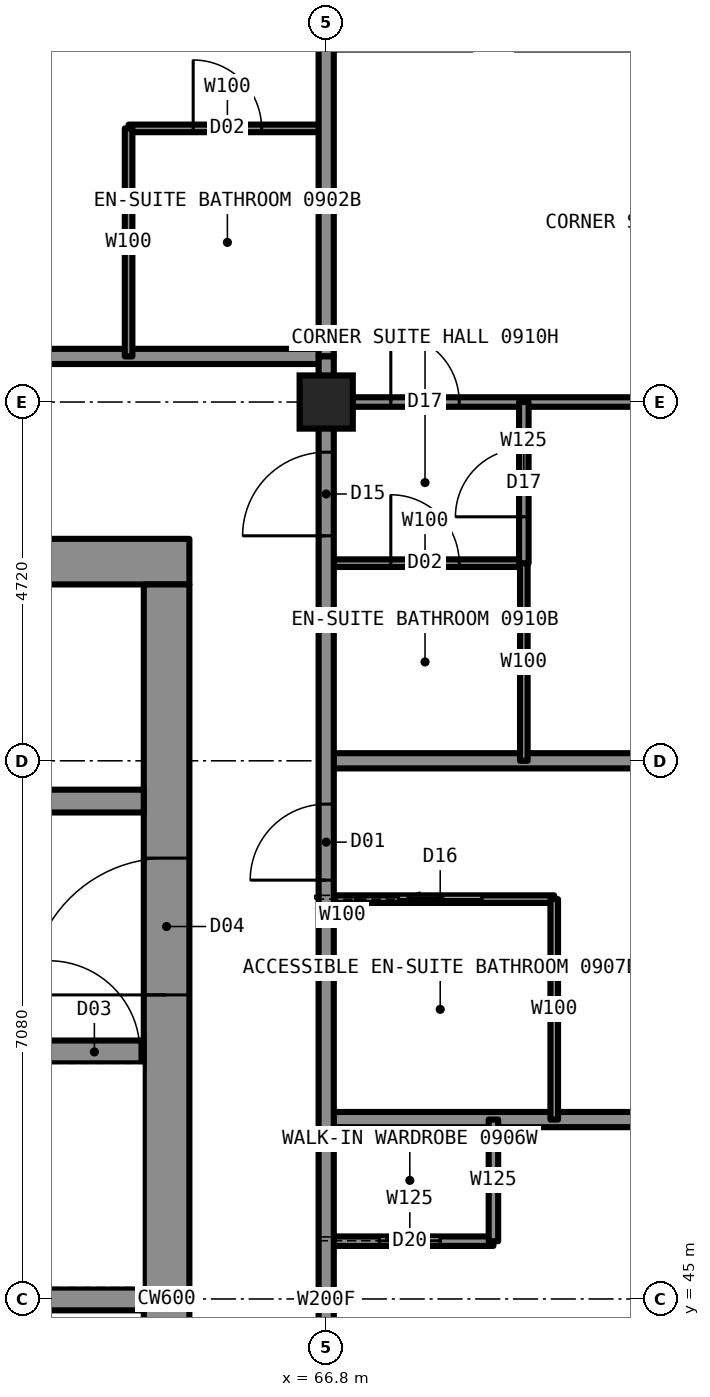
"""IFC4 building model, lengths in metres.
Left out: names, types, materials, properties, quantities, classifications, styles, units other than length and angle.
Written with IfcOpenShell. Run it as: python <this file> out.ifc"""

import sys

from ifc_helpers import new_model, si_unit, direction, frame, frame_2d, origin, origin_2d, place, context, subcontext, project, spatial, rectangle, hollow_rectangle, extrude, element, fill, save


model = new_model("IFC4")
c1 = context("Model", 3, precision=1e-05, world=origin(), true_north=direction((0.0, 1.0)))
c2 = subcontext(c1, "Body", "Model", "MODEL_VIEW")
j1 = project(units=[si_unit("LENGTHUNIT", "METRE"), si_unit("PLANEANGLEUNIT", "RADIAN")], contexts=[c1])
p1 = place(None, origin())
s1 = spatial("IfcSite", under=j1, at=p1, CompositionType="ELEMENT")
p2 = place(p1, origin())
s2 = spatial("IfcBuilding", under=s1, at=p2, CompositionType="ELEMENT")
p3 = place(p2, frame((0.0, 0.0, 39.0)))
s3 = spatial("IfcBuildingStorey", under=s2, at=p3, CompositionType="ELEMENT", Elevation=39.0)
p4 = place(p3, frame((66.8, 56.8, 0.0), z_axis=(0.0, 0.0, 1.0), x_axis=(1.0, 0.0, 0.0)))
e1 = element("IfcColumn", 1, at=p4, inside=s3, PredefinedType="COLUMN", context=c2, shape_type="SweptSolid", body=[
    extrude(hollow_rectangle(XDim=0.7, YDim=0.7, WallThickness=0.06, at=origin_2d()), origin(), (0.0, 0.0, 1.0), 3.5),
])
p5 = place(p3, frame((45.0, 54.7, 0.0), z_axis=(0.0, 0.0, 1.0), x_axis=(1.0, 0.0, 0.0)))
e2 = element("IfcWall", 2, at=p5, inside=s3, PredefinedType="SHEAR", context=c2, shape_type="SweptSolid", body=[
    extrude(rectangle(XDim=20.0, YDim=0.6, at=frame_2d((10.0, 0.0))), origin(), (0.0, 0.0, 1.0), 3.5),
])
p6 = place(p3, frame((64.7, 35.6, 0.0), z_axis=(0.0, 0.0, 1.0), x_axis=(0.0, 1.0, 0.0)))
e3 = element("IfcWall", 3, at=p6, inside=s3, PredefinedType="SHEAR", context=c2, shape_type="SweptSolid", body=[
    extrude(rectangle(XDim=18.8, YDim=0.6, at=frame_2d((9.4, 0.0))), origin(), (0.0, 0.0, 1.0), 3.5),
])
p7 = place(p6, frame((13.4, 0.0, 0.0)))
e4 = element("IfcOpeningElement", 4, at=p7, cuts=e3, PredefinedType="OPENING", context=c2, shape_type="SweptSolid", body=[
    extrude(rectangle(XDim=1.8, YDim=2.2, at=frame_2d((0.9, 1.1))), frame((0.0, 0.31, 0.0), z_axis=(0.0, -1.0, 0.0), x_axis=(1.0, 0.0, 0.0)), (0.0, 0.0, 1.0), 0.62),
])
p8 = place(p6, frame((3.6, 0.0, 0.0)))
e5 = element("IfcOpeningElement", 5, at=p8, cuts=e3, PredefinedType="OPENING", context=c2, shape_type="SweptSolid", body=[
    extrude(rectangle(XDim=1.8, YDim=2.2, at=frame_2d((0.9, 1.1))), frame((0.0, 0.31, 0.0), z_axis=(0.0, -1.0, 0.0), x_axis=(1.0, 0.0, 0.0)), (0.0, 0.0, 1.0), 0.62),
])
p9 = place(p3, frame((45.6, 51.55, 0.0), z_axis=(0.0, 0.0, 1.0), x_axis=(1.0, 0.0, 0.0)))
e6 = element("IfcWall", 6, at=p9, inside=s3, PredefinedType="SHEAR", context=c2, shape_type="SweptSolid", body=[
    extrude(rectangle(XDim=18.8, YDim=0.3, at=frame_2d((9.4, 0.0))), origin(), (0.0, 0.0, 1.0), 3.5),
])
p10 = place(p9, frame((0.7, 0.0, 0.0)))
e7 = element("IfcOpeningElement", 7, at=p10, cuts=e6, PredefinedType="OPENING", context=c2, shape_type="SweptSolid", body=[
    extrude(rectangle(XDim=1.1, YDim=2.2, at=frame_2d((0.55, 1.1))), frame((0.0, 0.16, 0.0), z_axis=(0.0, -1.0, 0.0), x_axis=(1.0, 0.0, 0.0)), (0.0, 0.0, 1.0), 0.32),
])
p11 = place(p9, frame((3.4, 0.0, 0.0)))
e8 = element("IfcOpeningElement", 8, at=p11, cuts=e6, PredefinedType="OPENING", context=c2, shape_type="SweptSolid", body=[
    extrude(rectangle(XDim=1.1, YDim=2.2, at=frame_2d((0.55, 1.1))), frame((0.0, 0.16, 0.0), z_axis=(0.0, -1.0, 0.0), x_axis=(1.0, 0.0, 0.0)), (0.0, 0.0, 1.0), 0.32),
])
p12 = place(p9, frame((6.1, 0.0, 0.0)))
e9 = element("IfcOpeningElement", 9, at=p12, cuts=e6, PredefinedType="OPENING", context=c2, shape_type="SweptSolid", body=[
    extrude(rectangle(XDim=1.1, YDim=2.2, at=frame_2d((0.55, 1.1))), frame((0.0, 0.16, 0.0), z_axis=(0.0, -1.0, 0.0), x_axis=(1.0, 0.0, 0.0)), (0.0, 0.0, 1.0), 0.32),
])
p13 = place(p9, frame((8.8, 0.0, 0.0)))
e10 = element("IfcOpeningElement", 10, at=p13, cuts=e6, PredefinedType="OPENING", context=c2, shape_type="SweptSolid", body=[
    extrude(rectangle(XDim=1.1, YDim=2.2, at=frame_2d((0.55, 1.1))), frame((0.0, 0.16, 0.0), z_axis=(0.0, -1.0, 0.0), x_axis=(1.0, 0.0, 0.0)), (0.0, 0.0, 1.0), 0.32),
])
p14 = place(p9, frame((11.6, 0.0, 0.0)))
e11 = element("IfcOpeningElement", 11, at=p14, cuts=e6, PredefinedType="OPENING", context=c2, shape_type="SweptSolid", body=[
    extrude(rectangle(XDim=1.1, YDim=2.2, at=frame_2d((0.55, 1.1))), frame((0.0, 0.16, 0.0), z_axis=(0.0, -1.0, 0.0), x_axis=(1.0, 0.0, 0.0)), (0.0, 0.0, 1.0), 0.32),
])
p15 = place(p9, frame((14.3, 0.0, 0.0)))
e12 = element("IfcOpeningElement", 12, at=p15, cuts=e6, PredefinedType="OPENING", context=c2, shape_type="SweptSolid", body=[
    extrude(rectangle(XDim=1.1, YDim=2.2, at=frame_2d((0.55, 1.1))), frame((0.0, 0.16, 0.0), z_axis=(0.0, -1.0, 0.0), x_axis=(1.0, 0.0, 0.0)), (0.0, 0.0, 1.0), 0.32),
])
p16 = place(p3, frame((56.2, 48.25, 0.0), z_axis=(0.0, 0.0, 1.0), x_axis=(1.0, 0.0, 0.0)))
e13 = element("IfcWall", 13, at=p16, inside=s3, PredefinedType="SHEAR", context=c2, shape_type="SweptSolid", body=[
    extrude(rectangle(XDim=8.2, YDim=0.3, at=frame_2d((4.1, 0.0))), origin(), (0.0, 0.0, 1.0), 3.5),
])
p17 = place(p16, frame((6.95, 0.0, 0.0)))
e14 = element("IfcOpeningElement", 14, at=p17, cuts=e13, PredefinedType="OPENING", context=c2, shape_type="SweptSolid", body=[
    extrude(rectangle(XDim=1.2, YDim=2.2, at=frame_2d((0.6, 1.1))), frame((0.0, 0.16, 0.0), z_axis=(0.0, -1.0, 0.0), x_axis=(1.0, 0.0, 0.0)), (0.0, 0.0, 1.0), 0.32),
])
p18 = place(p3, frame((56.5, 45.0, 0.0), z_axis=(0.0, 0.0, 1.0), x_axis=(1.0, 0.0, 0.0)))
e15 = element("IfcWall", 15, at=p18, inside=s3, PredefinedType="SHEAR", context=c2, shape_type="SweptSolid", body=[
    extrude(rectangle(XDim=7.9, YDim=0.3, at=frame_2d((3.95, 0.0))), origin(), (0.0, 0.0, 1.0), 3.5),
])
p19 = place(p3, frame((66.8, 45.76, 0.0), z_axis=(0.0, 0.0, 1.0), x_axis=(1.0, 0.0, 0.0)))
e16 = element("IfcWall", 16, at=p19, inside=s3, PredefinedType="PARTITIONING", context=c2, shape_type="SweptSolid", body=[
    extrude(rectangle(XDim=2.2, YDim=0.125, at=frame_2d((1.1, 0.0))), origin(), (0.0, 0.0, 1.0), 3.33),
])
p20 = place(p19, frame((0.7, 0.0, 0.0)))
e17 = element("IfcOpeningElement", 17, at=p20, cuts=e16, PredefinedType="OPENING", context=c2, shape_type="SweptSolid", body=[
    extrude(rectangle(XDim=0.8, YDim=2.1, at=frame_2d((0.4, 1.05))), frame((0.0, 0.073, 0.0), z_axis=(0.0, -1.0, 0.0), x_axis=(1.0, 0.0, 0.0)), (0.0, 0.0, 1.0), 0.145),
])
p21 = place(p3, frame((66.8, 56.8, 0.0), z_axis=(0.0, 0.0, 1.0), x_axis=(1.0, 0.0, 0.0)))
e18 = element("IfcWall", 18, at=p21, inside=s3, PredefinedType="PARTITIONING", context=c2, shape_type="SweptSolid", body=[
    extrude(rectangle(XDim=9.9, YDim=0.125, at=frame_2d((4.95, 0.0))), origin(), (0.0, 0.0, 1.0), 2.573),
])
p22 = place(p21, frame((0.85, 0.0, 0.0)))
e19 = element("IfcOpeningElement", 19, at=p22, cuts=e18, PredefinedType="OPENING", context=c2, shape_type="SweptSolid", body=[
    extrude(rectangle(XDim=0.9, YDim=2.2, at=frame_2d((0.45, 1.1))), frame((0.0, 0.073, 0.0), z_axis=(0.0, -1.0, 0.0), x_axis=(1.0, 0.0, 0.0)), (0.0, 0.0, 1.0), 0.145),
])
p23 = place(p3, frame((43.2, 57.4, 0.0), z_axis=(0.0, 0.0, 1.0), x_axis=(1.0, 0.0, 0.0)))
e20 = element("IfcWall", 20, at=p23, inside=s3, PredefinedType="PARTITIONING", context=c2, shape_type="SweptSolid", body=[
    extrude(rectangle(XDim=23.6, YDim=0.2, at=frame_2d((11.8, 0.0))), origin(), (0.0, 0.0, 1.0), 3.33),
])
p24 = place(p23, frame((3.0, 0.0, 0.0)))
e21 = element("IfcOpeningElement", 21, at=p24, cuts=e20, PredefinedType="OPENING", context=c2, shape_type="SweptSolid", body=[
    extrude(rectangle(XDim=1.0, YDim=2.2, at=frame_2d((0.5, 1.1))), frame((0.0, 0.11, 0.0), z_axis=(0.0, -1.0, 0.0), x_axis=(1.0, 0.0, 0.0)), (0.0, 0.0, 1.0), 0.22),
])
p25 = place(p23, frame((11.29, 0.0, 0.0)))
e22 = element("IfcOpeningElement", 22, at=p25, cuts=e20, PredefinedType="OPENING", context=c2, shape_type="SweptSolid", body=[
    extrude(rectangle(XDim=1.1, YDim=2.2, at=frame_2d((0.55, 1.1))), frame((0.0, 0.11, 0.0), z_axis=(0.0, -1.0, 0.0), x_axis=(1.0, 0.0, 0.0)), (0.0, 0.0, 1.0), 0.22),
])
p26 = place(p3, frame((64.2, 60.4, 0.0), z_axis=(0.0, 0.0, 1.0), x_axis=(1.0, 0.0, 0.0)))
e23 = element("IfcWall", 23, at=p26, inside=s3, PredefinedType="PARTITIONING", context=c2, shape_type="SweptSolid", body=[
    extrude(rectangle(XDim=2.6, YDim=0.1, at=frame_2d((1.3, 0.0))), origin(), (0.0, 0.0, 1.0), 3.33),
])
p27 = place(p26, frame((0.85, 0.0, 0.0)))
e24 = element("IfcOpeningElement", 24, at=p27, cuts=e23, PredefinedType="OPENING", context=c2, shape_type="SweptSolid", body=[
    extrude(rectangle(XDim=0.9, YDim=2.1, at=frame_2d((0.45, 1.05))), frame((0.0, 0.06, 0.0), z_axis=(0.0, -1.0, 0.0), x_axis=(1.0, 0.0, 0.0)), (0.0, 0.0, 1.0), 0.12),
])
p28 = place(p3, frame((66.8, 47.36, 0.0), z_axis=(0.0, 0.0, 1.0), x_axis=(1.0, 0.0, 0.0)))
e25 = element("IfcWall", 25, at=p28, inside=s3, PredefinedType="PARTITIONING", context=c2, shape_type="SweptSolid", body=[
    extrude(rectangle(XDim=9.9, YDim=0.2, at=frame_2d((4.95, 0.0))), origin(), (0.0, 0.0, 1.0), 2.723),
])
p29 = place(p3, frame((66.8, 50.26, 0.0), z_axis=(0.0, 0.0, 1.0), x_axis=(1.0, 0.0, 0.0)))
e26 = element("IfcWall", 26, at=p29, inside=s3, PredefinedType="PARTITIONING", context=c2, shape_type="SweptSolid", body=[
    extrude(rectangle(XDim=3.0, YDim=0.1, at=frame_2d((1.5, 0.0))), origin(), (0.0, 0.0, 1.0), 3.33),
])
p30 = place(p29, frame((0.95, 0.0, 0.0)))
e27 = element("IfcOpeningElement", 27, at=p30, cuts=e26, PredefinedType="OPENING", context=c2, shape_type="SweptSolid", body=[
    extrude(rectangle(XDim=1.1, YDim=2.1, at=frame_2d((0.55, 1.05))), frame((0.0, 0.06, 0.0), z_axis=(0.0, -1.0, 0.0), x_axis=(1.0, 0.0, 0.0)), (0.0, 0.0, 1.0), 0.12),
])
p31 = place(p3, frame((66.8, 52.08, 0.0), z_axis=(0.0, 0.0, 1.0), x_axis=(1.0, 0.0, 0.0)))
e28 = element("IfcWall", 28, at=p31, inside=s3, PredefinedType="PARTITIONING", context=c2, shape_type="SweptSolid", body=[
    extrude(rectangle(XDim=9.9, YDim=0.2, at=frame_2d((4.95, 0.0))), origin(), (0.0, 0.0, 1.0), 2.573),
])
p32 = place(p3, frame((66.8, 54.68, 0.0), z_axis=(0.0, 0.0, 1.0), x_axis=(1.0, 0.0, 0.0)))
e29 = element("IfcWall", 29, at=p32, inside=s3, PredefinedType="PARTITIONING", context=c2, shape_type="SweptSolid", body=[
    extrude(rectangle(XDim=2.6, YDim=0.1, at=frame_2d((1.3, 0.0))), origin(), (0.0, 0.0, 1.0), 3.33),
])
p33 = place(p32, frame((0.85, 0.0, 0.0)))
e30 = element("IfcOpeningElement", 30, at=p33, cuts=e29, PredefinedType="OPENING", context=c2, shape_type="SweptSolid", body=[
    extrude(rectangle(XDim=0.9, YDim=2.1, at=frame_2d((0.45, 1.05))), frame((0.0, 0.06, 0.0), z_axis=(0.0, -1.0, 0.0), x_axis=(1.0, 0.0, 0.0)), (0.0, 0.0, 1.0), 0.12),
])
p34 = place(p3, frame((66.8, 33.2, 0.0), z_axis=(0.0, 0.0, 1.0), x_axis=(0.0, 1.0, 0.0)))
e31 = element("IfcWall", 31, at=p34, inside=s3, PredefinedType="PARTITIONING", context=c2, shape_type="SweptSolid", body=[
    extrude(rectangle(XDim=23.58, YDim=0.2, at=frame_2d((11.79, 0.0))), origin(), (0.0, 0.0, 1.0), 3.33),
])
p35 = place(p34, frame((7.72, 0.0, 0.0)))
e32 = element("IfcOpeningElement", 32, at=p35, cuts=e31, PredefinedType="OPENING", context=c2, shape_type="SweptSolid", body=[
    extrude(rectangle(XDim=1.0, YDim=2.2, at=frame_2d((0.5, 1.1))), frame((0.0, 0.11, 0.0), z_axis=(0.0, -1.0, 0.0), x_axis=(1.0, 0.0, 0.0)), (0.0, 0.0, 1.0), 0.22),
])
p36 = place(p34, frame((17.31, 0.0, 0.0)))
e33 = element("IfcOpeningElement", 33, at=p36, cuts=e31, PredefinedType="OPENING", context=c2, shape_type="SweptSolid", body=[
    extrude(rectangle(XDim=1.0, YDim=2.2, at=frame_2d((0.5, 1.1))), frame((0.0, 0.11, 0.0), z_axis=(0.0, -1.0, 0.0), x_axis=(1.0, 0.0, 0.0)), (0.0, 0.0, 1.0), 0.22),
])
p37 = place(p34, frame((21.84, 0.0, 0.0)))
e34 = element("IfcOpeningElement", 34, at=p37, cuts=e31, PredefinedType="OPENING", context=c2, shape_type="SweptSolid", body=[
    extrude(rectangle(XDim=1.1, YDim=2.2, at=frame_2d((0.55, 1.1))), frame((0.0, 0.11, 0.0), z_axis=(0.0, -1.0, 0.0), x_axis=(1.0, 0.0, 0.0)), (0.0, 0.0, 1.0), 0.22),
])
p38 = place(p34, frame((0.66, 0.0, 0.0)))
e35 = element("IfcOpeningElement", 35, at=p38, cuts=e31, PredefinedType="OPENING", context=c2, shape_type="SweptSolid", body=[
    extrude(rectangle(XDim=1.1, YDim=2.2, at=frame_2d((0.55, 1.1))), frame((0.0, 0.11, 0.0), z_axis=(0.0, -1.0, 0.0), x_axis=(1.0, 0.0, 0.0)), (0.0, 0.0, 1.0), 0.22),
])
p39 = place(p3, frame((66.8, 57.4, 0.0), z_axis=(0.0, 0.0, 1.0), x_axis=(0.0, 1.0, 0.0)))
e36 = element("IfcWall", 36, at=p39, inside=s3, PredefinedType="PARTITIONING", context=c2, shape_type="SweptSolid", body=[
    extrude(rectangle(XDim=9.3, YDim=0.2, at=frame_2d((4.65, 0.0))), origin(), (0.0, 0.0, 1.0), 2.573),
])
p40 = place(p3, frame((69.0, 45.76, 0.0), z_axis=(0.0, 0.0, 1.0), x_axis=(0.0, 1.0, 0.0)))
e37 = element("IfcWall", 37, at=p40, inside=s3, PredefinedType="PARTITIONING", context=c2, shape_type="SweptSolid", body=[
    extrude(rectangle(XDim=1.6, YDim=0.125, at=frame_2d((0.8, 0.0))), origin(), (0.0, 0.0, 1.0), 3.33),
])
p41 = place(p3, frame((69.4, 52.08, 0.0), z_axis=(0.0, 0.0, 1.0), x_axis=(0.0, 1.0, 0.0)))
e38 = element("IfcWall", 38, at=p41, inside=s3, PredefinedType="PARTITIONING", context=c2, shape_type="SweptSolid", body=[
    extrude(rectangle(XDim=2.6, YDim=0.1, at=frame_2d((1.3, 0.0))), origin(), (0.0, 0.0, 1.0), 3.33),
])
p42 = place(p3, frame((69.4, 54.68, 0.0), z_axis=(0.0, 0.0, 1.0), x_axis=(0.0, 1.0, 0.0)))
e39 = element("IfcWall", 39, at=p42, inside=s3, PredefinedType="PARTITIONING", context=c2, shape_type="SweptSolid", body=[
    extrude(rectangle(XDim=2.12, YDim=0.125, at=frame_2d((1.06, 0.0))), origin(), (0.0, 0.0, 1.0), 3.33),
])
p43 = place(p42, frame((0.61, 0.0, 0.0)))
e40 = element("IfcOpeningElement", 40, at=p43, cuts=e39, PredefinedType="OPENING", context=c2, shape_type="SweptSolid", body=[
    extrude(rectangle(XDim=0.9, YDim=2.2, at=frame_2d((0.45, 1.1))), frame((0.0, 0.073, 0.0), z_axis=(0.0, -1.0, 0.0), x_axis=(1.0, 0.0, 0.0)), (0.0, 0.0, 1.0), 0.145),
])
p44 = place(p3, frame((69.8, 47.36, 0.0), z_axis=(0.0, 0.0, 1.0), x_axis=(0.0, 1.0, 0.0)))
e41 = element("IfcWall", 41, at=p44, inside=s3, PredefinedType="PARTITIONING", context=c2, shape_type="SweptSolid", body=[
    extrude(rectangle(XDim=2.9, YDim=0.1, at=frame_2d((1.45, 0.0))), origin(), (0.0, 0.0, 1.0), 3.33),
])
p45 = place(p3, frame((64.2, 57.4, 0.0), z_axis=(0.0, 0.0, 1.0), x_axis=(0.0, 1.0, 0.0)))
e42 = element("IfcWall", 42, at=p45, inside=s3, PredefinedType="PARTITIONING", context=c2, shape_type="SweptSolid", body=[
    extrude(rectangle(XDim=3.0, YDim=0.1, at=frame_2d((1.5, 0.0))), origin(), (0.0, 0.0, 1.0), 3.33),
])
p46 = place(p3, frame((66.8, 56.78, 0.0), z_axis=(0.0, 0.0, 1.0), x_axis=(0.0, 1.0, 0.0)))
e43 = element("IfcWall", 43, at=p46, inside=s3, PredefinedType="PARTITIONING", context=c2, shape_type="SweptSolid", body=[
    extrude(rectangle(XDim=0.62, YDim=0.2, at=frame_2d((0.31, 0.0))), origin(), (0.0, 0.0, 1.0), 2.573),
])
p47 = place(p27, origin())
e44 = element("IfcDoor", 44, at=p47, inside=s3, OperationType="SINGLE_SWING_RIGHT", PredefinedType="DOOR", context=c2, shape_type="SweptSolid", body=[
    extrude(rectangle(XDim=0.9, YDim=2.1, at=frame_2d((0.45, 1.05))), frame((0.0, 0.025, 0.0), z_axis=(0.0, -1.0, 0.0), x_axis=(1.0, 0.0, 0.0)), (0.0, 0.0, 1.0), 0.05),
])
fill(e24, e44)
p48 = place(p20, origin())
e45 = element("IfcDoor", 45, at=p48, inside=s3, OperationType="SLIDING_TO_LEFT", PredefinedType="DOOR", context=c2, shape_type="SweptSolid", body=[
    extrude(rectangle(XDim=0.8, YDim=2.1, at=frame_2d((0.4, 1.05))), frame((0.0, 0.025, 0.0), z_axis=(0.0, -1.0, 0.0), x_axis=(1.0, 0.0, 0.0)), (0.0, 0.0, 1.0), 0.05),
])
fill(e17, e45)
p49 = place(p36, origin())
e46 = element("IfcDoor", 46, at=p49, inside=s3, OperationType="SINGLE_SWING_LEFT", PredefinedType="DOOR", context=c2, shape_type="SweptSolid", body=[
    extrude(rectangle(XDim=1.0, YDim=2.2, at=frame_2d((0.5, 1.1))), frame((0.0, 0.025, 0.0), z_axis=(0.0, -1.0, 0.0), x_axis=(1.0, 0.0, 0.0)), (0.0, 0.0, 1.0), 0.05),
])
fill(e33, e46)
p50 = place(p30, origin())
e47 = element("IfcDoor", 47, at=p50, inside=s3, OperationType="SLIDING_TO_LEFT", PredefinedType="DOOR", context=c2, shape_type="SweptSolid", body=[
    extrude(rectangle(XDim=1.1, YDim=2.1, at=frame_2d((0.55, 1.05))), frame((0.0, 0.025, 0.0), z_axis=(0.0, -1.0, 0.0), x_axis=(1.0, 0.0, 0.0)), (0.0, 0.0, 1.0), 0.05),
])
fill(e27, e47)
p51 = place(p22, origin())
e48 = element("IfcDoor", 48, at=p51, inside=s3, OperationType="SINGLE_SWING_LEFT", PredefinedType="DOOR", context=c2, shape_type="SweptSolid", body=[
    extrude(rectangle(XDim=0.9, YDim=2.2, at=frame_2d((0.45, 1.1))), frame((0.0, 0.025, 0.0), z_axis=(0.0, -1.0, 0.0), x_axis=(1.0, 0.0, 0.0)), (0.0, 0.0, 1.0), 0.05),
])
fill(e19, e48)
p52 = place(p33, origin())
e49 = element("IfcDoor", 49, at=p52, inside=s3, OperationType="SINGLE_SWING_RIGHT", PredefinedType="DOOR", context=c2, shape_type="SweptSolid", body=[
    extrude(rectangle(XDim=0.9, YDim=2.1, at=frame_2d((0.45, 1.05))), frame((0.0, 0.025, 0.0), z_axis=(0.0, -1.0, 0.0), x_axis=(1.0, 0.0, 0.0)), (0.0, 0.0, 1.0), 0.05),
])
fill(e30, e49)
p53 = place(p37, origin())
e50 = element("IfcDoor", 50, at=p53, inside=s3, OperationType="SINGLE_SWING_LEFT", PredefinedType="DOOR", context=c2, shape_type="SweptSolid", body=[
    extrude(rectangle(XDim=1.1, YDim=2.2, at=frame_2d((0.55, 1.1))), frame((0.0, 0.025, 0.0), z_axis=(0.0, -1.0, 0.0), x_axis=(1.0, 0.0, 0.0)), (0.0, 0.0, 1.0), 0.05),
])
fill(e34, e50)
p54 = place(p43, origin())
e51 = element("IfcDoor", 51, at=p54, inside=s3, OperationType="SINGLE_SWING_LEFT", PredefinedType="DOOR", context=c2, shape_type="SweptSolid", body=[
    extrude(rectangle(XDim=0.9, YDim=2.2, at=frame_2d((0.45, 1.1))), frame((0.0, 0.025, 0.0), z_axis=(0.0, -1.0, 0.0), x_axis=(1.0, 0.0, 0.0)), (0.0, 0.0, 1.0), 0.05),
])
fill(e40, e51)
p55 = place(p7, origin())
e52 = element("IfcDoor", 52, at=p55, inside=s3, OperationType="DOUBLE_DOOR_SINGLE_SWING", PredefinedType="DOOR", context=c2, shape_type="SweptSolid", body=[
    extrude(rectangle(XDim=1.8, YDim=2.2, at=frame_2d((0.9, 1.1))), frame((0.0, 0.025, 0.0), z_axis=(0.0, -1.0, 0.0), x_axis=(1.0, 0.0, 0.0)), (0.0, 0.0, 1.0), 0.05),
])
fill(e4, e52)
p56 = place(p17, origin())
e53 = element("IfcDoor", 53, at=p56, inside=s3, OperationType="SINGLE_SWING_LEFT", PredefinedType="DOOR", context=c2, shape_type="SweptSolid", body=[
    extrude(rectangle(XDim=1.2, YDim=2.2, at=frame_2d((0.6, 1.1))), frame((0.0, 0.025, 0.0), z_axis=(0.0, -1.0, 0.0), x_axis=(1.0, 0.0, 0.0)), (0.0, 0.0, 1.0), 0.05),
])
fill(e14, e53)
save(model, sys.argv[1])
